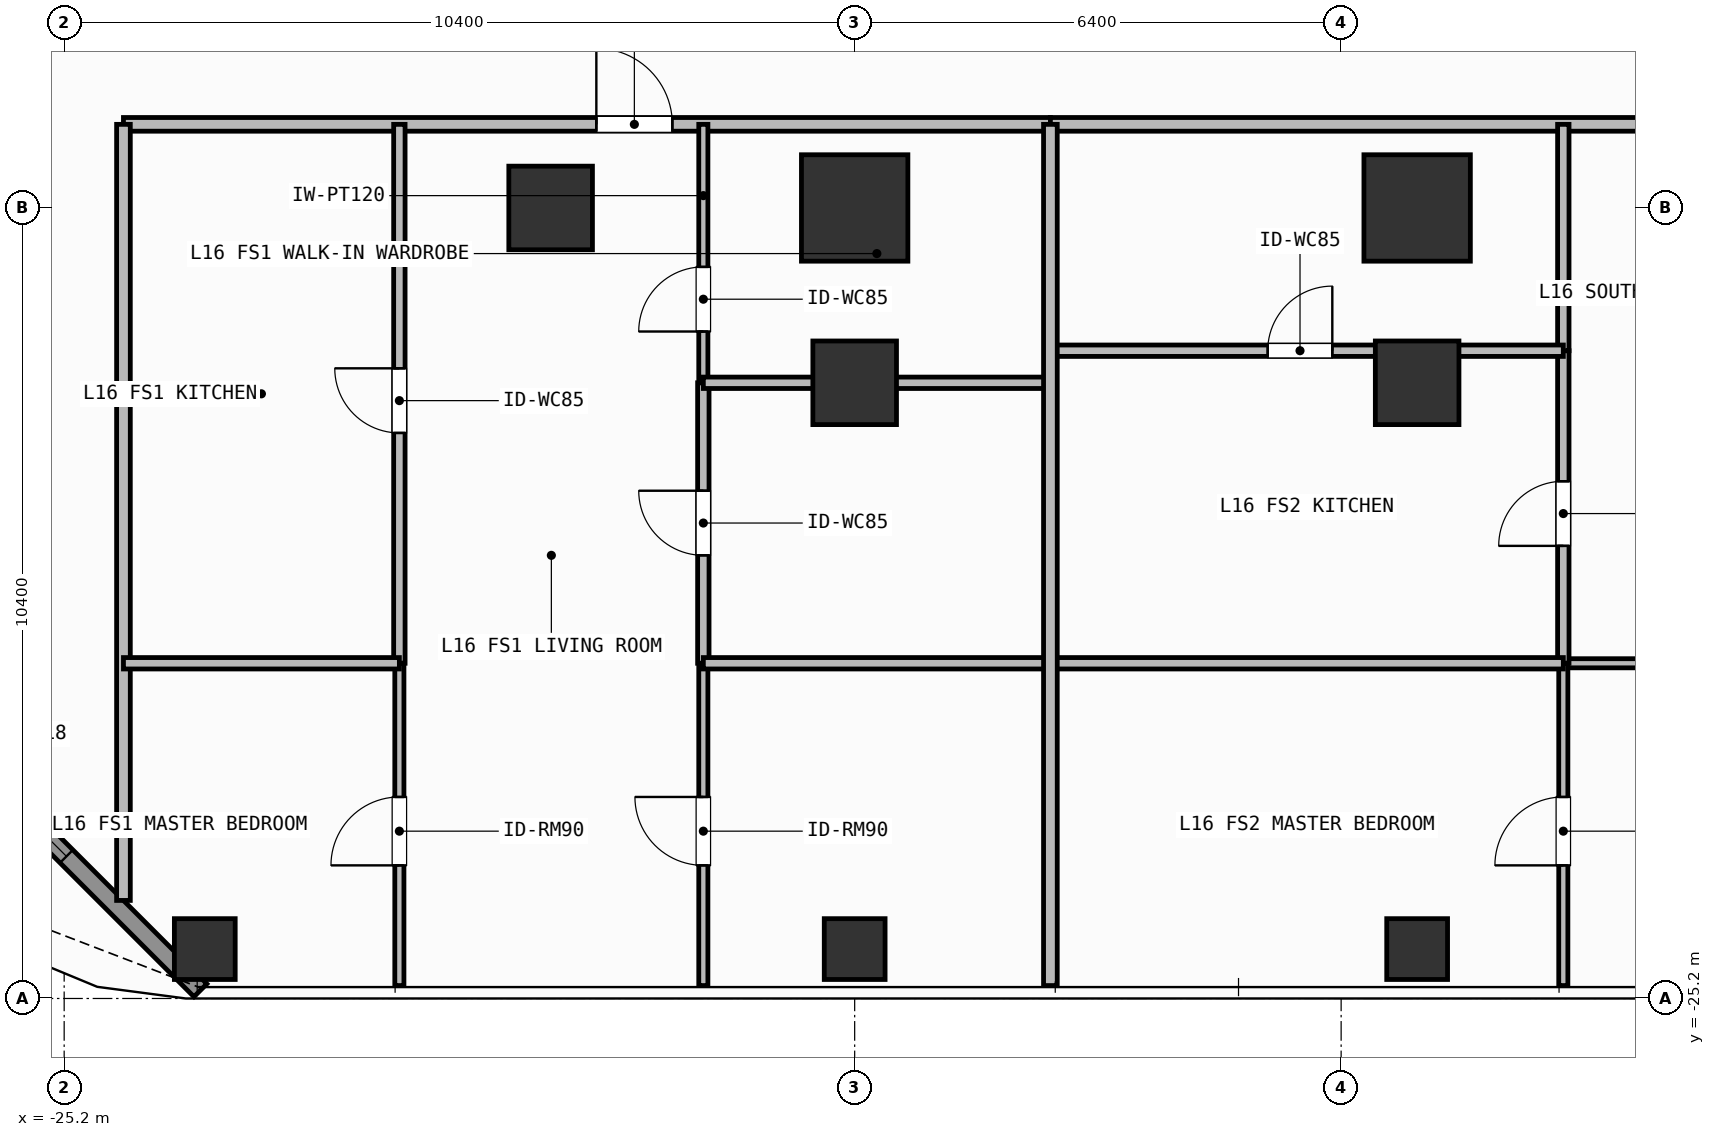
"""IFC4 building model, lengths in metres.
Left out: names, types, materials, properties, quantities, classifications, styles, units other than length and angle.
Written with IfcOpenShell. Run it as: python <this file> out.ifc"""

import sys

from ifc_helpers import new_model, si_unit, direction, frame, frame_2d, origin, origin_2d, place, context, subcontext, project, spatial, rectangle, hollow_rectangle, extrude, element, fill, save


model = new_model("IFC4")
c1 = context("Model", 3, precision=1e-05, world=origin(), true_north=direction((0.0, 1.0)))
c2 = subcontext(c1, "Body", "Model", "MODEL_VIEW")
j1 = project(units=[si_unit("LENGTHUNIT", "METRE"), si_unit("PLANEANGLEUNIT", "RADIAN")], contexts=[c1])
p1 = place(None, origin())
s1 = spatial("IfcSite", under=j1, at=p1, CompositionType="ELEMENT")
p2 = place(p1, origin())
s2 = spatial("IfcBuilding", under=s1, at=p2, CompositionType="ELEMENT")
p3 = place(p2, frame((0.0, 0.0, 61.8)))
s3 = spatial("IfcBuildingStorey", under=s2, at=p3, CompositionType="ELEMENT", Elevation=61.8)
for number, where, z_axis, x_axis in (
    (1, (-14.8, -14.8, 0.0), (0.0, 0.0, 1.0), (1.0, 0.0, 0.0)),
    (2, (-7.4, -14.8, 0.0), (0.0, 0.0, 1.0), (1.0, 0.0, 0.0)),
):
    element("IfcColumn", number, at=place(p3, frame(where, z_axis=z_axis, x_axis=x_axis)), inside=s3, PredefinedType="COLUMN", context=c2, shape_type="SweptSolid", body=[
        extrude(rectangle(XDim=1.4, YDim=1.4, at=origin_2d()), origin(), (0.0, 0.0, 1.0), 3.9),
    ])
for number, where, z_axis, x_axis in (
    (3, (-18.8, -14.8, 0.0), (0.0, 0.0, 1.0), (1.0, 0.0, 0.0)),
    (4, (-14.8, -17.1, 0.0), (0.0, 0.0, 1.0), (1.0, 0.0, 0.0)),
    (5, (-7.4, -17.1, 0.0), (0.0, 0.0, 1.0), (1.0, 0.0, 0.0)),
):
    element("IfcColumn", number, at=place(p3, frame(where, z_axis=z_axis, x_axis=x_axis)), inside=s3, PredefinedType="COLUMN", context=c2, shape_type="SweptSolid", body=[
        extrude(rectangle(XDim=1.1, YDim=1.1, at=origin_2d()), origin(), (0.0, 0.0, 1.0), 3.9),
    ])
for number, where, z_axis, x_axis in (
    (6, (-23.35, -24.55, 0.0), (0.0, 0.0, 1.0), (1.0, 0.0, 0.0)),
    (7, (-14.8, -24.55, 0.0), (0.0, 0.0, 1.0), (1.0, 0.0, 0.0)),
    (8, (-7.4, -24.55, 0.0), (0.0, 0.0, 1.0), (1.0, 0.0, 0.0)),
):
    element("IfcColumn", number, at=place(p3, frame(where, z_axis=z_axis, x_axis=x_axis)), inside=s3, PredefinedType="COLUMN", context=c2, shape_type="SweptSolid", body=[
        extrude(hollow_rectangle(XDim=0.8, YDim=0.8, WallThickness=0.036, at=origin_2d()), origin(), (0.0, 0.0, 1.0), 3.9),
    ])
p4 = place(p3, frame((-23.408, -25.092, 0.0), z_axis=(0.0, 0.0, 1.0), x_axis=(-0.707106781187, 0.707106781187, 0.0)))
e9 = element("IfcWall", 9, at=p4, inside=s3, PredefinedType="SOLIDWALL", context=c2, shape_type="SweptSolid", body=[
    extrude(rectangle(XDim=6.484, YDim=0.24, at=frame_2d((3.242, 0.0))), origin(), (0.0, 0.0, 1.0), 3.68),
])
p5 = place(p4, frame((2.492, 0.0, 0.8)))
e10 = element("IfcOpeningElement", 10, at=p5, cuts=e9, PredefinedType="OPENING", context=c2, shape_type="SweptSolid", body=[
    extrude(rectangle(XDim=1.5, YDim=1.85, at=frame_2d((0.75, 0.925))), frame((0.0, 0.13, 0.0), z_axis=(0.0, -1.0, 0.0), x_axis=(1.0, 0.0, 0.0)), (0.0, 0.0, 1.0), 0.26),
])
p6 = place(p3, frame((-24.42, -13.7, 0.0), z_axis=(0.0, 0.0, 1.0), x_axis=(1.0, 0.0, 0.0)))
e11 = element("IfcWall", 11, at=p6, inside=s3, PredefinedType="PARTITIONING", context=c2, shape_type="SweptSolid", body=[
    extrude(rectangle(XDim=12.195, YDim=0.18, at=frame_2d((6.097, 0.0))), origin(), (0.0, 0.0, 1.0), 3.68),
])
p7 = place(p6, frame((6.221, 0.0, 0.0)))
e12 = element("IfcOpeningElement", 12, at=p7, cuts=e11, PredefinedType="OPENING", context=c2, shape_type="SweptSolid", body=[
    extrude(rectangle(XDim=1.0, YDim=2.2, at=frame_2d((0.5, 1.1))), frame((0.0, 0.1, 0.0), z_axis=(0.0, -1.0, 0.0), x_axis=(1.0, 0.0, 0.0)), (0.0, 0.0, 1.0), 0.2),
])
p8 = place(p3, frame((-20.79, -20.79, 0.0), z_axis=(0.0, 0.0, 1.0), x_axis=(0.0, 1.0, 0.0)))
e13 = element("IfcWall", 13, at=p8, inside=s3, PredefinedType="PARTITIONING", context=c2, shape_type="SweptSolid", body=[
    extrude(rectangle(XDim=7.09, YDim=0.15, at=frame_2d((3.545, 0.0))), origin(), (0.0, 0.0, 1.0), 3.68),
])
p9 = place(p8, frame((3.03, 0.0, 0.0)))
e14 = element("IfcOpeningElement", 14, at=p9, cuts=e13, PredefinedType="OPENING", context=c2, shape_type="SweptSolid", body=[
    extrude(rectangle(XDim=0.85, YDim=2.1, at=frame_2d((0.425, 1.05))), frame((0.0, 0.085, 0.0), z_axis=(0.0, -1.0, 0.0), x_axis=(1.0, 0.0, 0.0)), (0.0, 0.0, 1.0), 0.17),
])
p10 = place(p3, frame((-20.79, -25.03, 0.0), z_axis=(0.0, 0.0, 1.0), x_axis=(0.0, 1.0, 0.0)))
e15 = element("IfcWall", 15, at=p10, inside=s3, PredefinedType="PARTITIONING", context=c2, shape_type="SweptSolid", body=[
    extrude(rectangle(XDim=4.24, YDim=0.12, at=frame_2d((2.12, 0.0))), origin(), (0.0, 0.0, 1.0), 3.68),
])
p11 = place(p10, frame((1.581, 0.0, 0.0)))
e16 = element("IfcOpeningElement", 16, at=p11, cuts=e15, PredefinedType="OPENING", context=c2, shape_type="SweptSolid", body=[
    extrude(rectangle(XDim=0.9, YDim=2.1, at=frame_2d((0.45, 1.05))), frame((0.0, 0.07, 0.0), z_axis=(0.0, -1.0, 0.0), x_axis=(1.0, 0.0, 0.0)), (0.0, 0.0, 1.0), 0.14),
])
p12 = place(p3, frame((-16.791, -20.79, 0.0), z_axis=(0.0, 0.0, 1.0), x_axis=(0.0, 1.0, 0.0)))
e17 = element("IfcWall", 17, at=p12, inside=s3, PredefinedType="PARTITIONING", context=c2, shape_type="SweptSolid", body=[
    extrude(rectangle(XDim=3.69, YDim=0.15, at=frame_2d((1.845, 0.0))), origin(), (0.0, 0.0, 1.0), 3.68),
])
p13 = place(p12, frame((1.42, 0.0, 0.0)))
e18 = element("IfcOpeningElement", 18, at=p13, cuts=e17, PredefinedType="OPENING", context=c2, shape_type="SweptSolid", body=[
    extrude(rectangle(XDim=0.85, YDim=2.1, at=frame_2d((0.425, 1.05))), frame((0.0, 0.085, 0.0), z_axis=(0.0, -1.0, 0.0), x_axis=(1.0, 0.0, 0.0)), (0.0, 0.0, 1.0), 0.17),
])
p14 = place(p3, frame((-16.791, -17.1, 0.0), z_axis=(0.0, 0.0, 1.0), x_axis=(0.0, 1.0, 0.0)))
e19 = element("IfcWall", 19, at=p14, inside=s3, PredefinedType="PARTITIONING", context=c2, shape_type="SweptSolid", body=[
    extrude(rectangle(XDim=3.4, YDim=0.12, at=frame_2d((1.7, 0.0))), origin(), (0.0, 0.0, 1.0), 3.68),
])
p15 = place(p14, frame((0.675, 0.0, 0.0)))
e20 = element("IfcOpeningElement", 20, at=p15, cuts=e19, PredefinedType="OPENING", context=c2, shape_type="SweptSolid", body=[
    extrude(rectangle(XDim=0.85, YDim=2.1, at=frame_2d((0.425, 1.05))), frame((0.0, 0.07, 0.0), z_axis=(0.0, -1.0, 0.0), x_axis=(1.0, 0.0, 0.0)), (0.0, 0.0, 1.0), 0.14),
])
p16 = place(p3, frame((-16.791, -25.03, 0.0), z_axis=(0.0, 0.0, 1.0), x_axis=(0.0, 1.0, 0.0)))
e21 = element("IfcWall", 21, at=p16, inside=s3, PredefinedType="PARTITIONING", context=c2, shape_type="SweptSolid", body=[
    extrude(rectangle(XDim=4.24, YDim=0.12, at=frame_2d((2.12, 0.0))), origin(), (0.0, 0.0, 1.0), 3.68),
])
p17 = place(p16, frame((1.581, 0.0, 0.0)))
e22 = element("IfcOpeningElement", 22, at=p17, cuts=e21, PredefinedType="OPENING", context=c2, shape_type="SweptSolid", body=[
    extrude(rectangle(XDim=0.9, YDim=2.1, at=frame_2d((0.45, 1.05))), frame((0.0, 0.07, 0.0), z_axis=(0.0, -1.0, 0.0), x_axis=(1.0, 0.0, 0.0)), (0.0, 0.0, 1.0), 0.14),
])
p18 = place(p3, frame((-12.225, -13.7, 0.0), z_axis=(0.0, 0.0, 1.0), x_axis=(1.0, 0.0, 0.0)))
e23 = element("IfcWall", 23, at=p18, inside=s3, PredefinedType="PARTITIONING", context=c2, shape_type="SweptSolid", body=[
    extrude(rectangle(XDim=17.467, YDim=0.18, at=frame_2d((8.733, 0.0))), origin(), (0.0, 0.0, 1.0), 3.68),
])
p19 = place(p18, frame((9.848, 0.0, 0.0)))
e24 = element("IfcOpeningElement", 24, at=p19, cuts=e23, PredefinedType="OPENING", context=c2, shape_type="SweptSolid", body=[
    extrude(rectangle(XDim=1.0, YDim=2.2, at=frame_2d((0.5, 1.1))), frame((0.0, 0.1, 0.0), z_axis=(0.0, -1.0, 0.0), x_axis=(1.0, 0.0, 0.0)), (0.0, 0.0, 1.0), 0.2),
])
p20 = place(p3, frame((-5.477, -20.79, 0.0), z_axis=(0.0, 0.0, 1.0), x_axis=(1.0, 0.0, 0.0)))
e25 = element("IfcWall", 25, at=p20, inside=s3, PredefinedType="PARTITIONING", context=c2, shape_type="SweptSolid", body=[
    extrude(rectangle(XDim=7.471, YDim=0.12, at=frame_2d((3.735, 0.0))), origin(), (0.0, 0.0, 1.0), 3.68),
])
p21 = place(p20, frame((3.375, 0.0, 0.0)))
e26 = element("IfcOpeningElement", 26, at=p21, cuts=e25, PredefinedType="OPENING", context=c2, shape_type="SweptSolid", body=[
    extrude(rectangle(XDim=0.9, YDim=2.1, at=frame_2d((0.45, 1.05))), frame((0.0, 0.07, 0.0), z_axis=(0.0, -1.0, 0.0), x_axis=(1.0, 0.0, 0.0)), (0.0, 0.0, 1.0), 0.14),
])
p22 = place(p3, frame((-5.477, -20.79, 0.0), z_axis=(0.0, 0.0, 1.0), x_axis=(0.0, 1.0, 0.0)))
e27 = element("IfcWall", 27, at=p22, inside=s3, PredefinedType="PARTITIONING", context=c2, shape_type="SweptSolid", body=[
    extrude(rectangle(XDim=4.112, YDim=0.15, at=frame_2d((2.056, 0.0))), origin(), (0.0, 0.0, 1.0), 3.68),
])
p23 = place(p22, frame((1.544, 0.0, 0.0)))
e28 = element("IfcOpeningElement", 28, at=p23, cuts=e27, PredefinedType="OPENING", context=c2, shape_type="SweptSolid", body=[
    extrude(rectangle(XDim=0.85, YDim=2.1, at=frame_2d((0.425, 1.05))), frame((0.0, 0.085, 0.0), z_axis=(0.0, -1.0, 0.0), x_axis=(1.0, 0.0, 0.0)), (0.0, 0.0, 1.0), 0.17),
])
p24 = place(p3, frame((-5.477, -16.678, 0.0), z_axis=(0.0, 0.0, 1.0), x_axis=(0.0, 1.0, 0.0)))
e29 = element("IfcWall", 29, at=p24, inside=s3, PredefinedType="PARTITIONING", context=c2, shape_type="SweptSolid", body=[
    extrude(rectangle(XDim=2.978, YDim=0.15, at=frame_2d((1.489, 0.0))), origin(), (0.0, 0.0, 1.0), 3.68),
])
p25 = place(p3, frame((-5.477, -25.03, 0.0), z_axis=(0.0, 0.0, 1.0), x_axis=(0.0, 1.0, 0.0)))
e30 = element("IfcWall", 30, at=p25, inside=s3, PredefinedType="PARTITIONING", context=c2, shape_type="SweptSolid", body=[
    extrude(rectangle(XDim=4.24, YDim=0.12, at=frame_2d((2.12, 0.0))), origin(), (0.0, 0.0, 1.0), 3.68),
])
p26 = place(p25, frame((1.581, 0.0, 0.0)))
e31 = element("IfcOpeningElement", 31, at=p26, cuts=e30, PredefinedType="OPENING", context=c2, shape_type="SweptSolid", body=[
    extrude(rectangle(XDim=0.9, YDim=2.1, at=frame_2d((0.45, 1.05))), frame((0.0, 0.07, 0.0), z_axis=(0.0, -1.0, 0.0), x_axis=(1.0, 0.0, 0.0)), (0.0, 0.0, 1.0), 0.14),
])
p27 = place(p3, frame((-24.42, -23.91, 0.0), z_axis=(0.0, 0.0, 1.0), x_axis=(0.0, 1.0, 0.0)))
e32 = element("IfcWall", 32, at=p27, inside=s3, PredefinedType="PARTITIONING", context=c2, shape_type="SweptSolid", body=[
    extrude(rectangle(XDim=10.21, YDim=0.18, at=frame_2d((5.105, 0.0))), origin(), (0.0, 0.0, 1.0), 3.68),
])
p28 = place(p3, frame((-24.42, -20.79, 0.0), z_axis=(0.0, 0.0, 1.0), x_axis=(1.0, 0.0, 0.0)))
e33 = element("IfcWall", 33, at=p28, inside=s3, PredefinedType="PARTITIONING", context=c2, shape_type="SweptSolid", body=[
    extrude(rectangle(XDim=3.63, YDim=0.15, at=frame_2d((1.815, 0.0))), origin(), (0.0, 0.0, 1.0), 3.68),
])
p29 = place(p3, frame((-16.791, -17.1, 0.0), z_axis=(0.0, 0.0, 1.0), x_axis=(1.0, 0.0, 0.0)))
e34 = element("IfcWall", 34, at=p29, inside=s3, PredefinedType="PARTITIONING", context=c2, shape_type="SweptSolid", body=[
    extrude(rectangle(XDim=4.566, YDim=0.15, at=frame_2d((2.283, 0.0))), origin(), (0.0, 0.0, 1.0), 3.082),
])
p30 = place(p3, frame((-16.791, -20.79, 0.0), z_axis=(0.0, 0.0, 1.0), x_axis=(1.0, 0.0, 0.0)))
e35 = element("IfcWall", 35, at=p30, inside=s3, PredefinedType="PARTITIONING", context=c2, shape_type="SweptSolid", body=[
    extrude(rectangle(XDim=4.566, YDim=0.15, at=frame_2d((2.283, 0.0))), origin(), (0.0, 0.0, 1.0), 3.68),
])
p31 = place(p3, frame((-12.225, -16.678, 0.0), z_axis=(0.0, 0.0, 1.0), x_axis=(1.0, 0.0, 0.0)))
e36 = element("IfcWall", 36, at=p31, inside=s3, PredefinedType="PARTITIONING", context=c2, shape_type="SweptSolid", body=[
    extrude(rectangle(XDim=6.748, YDim=0.15, at=frame_2d((3.374, 0.0))), origin(), (0.0, 0.0, 1.0), 3.68),
])
p32 = place(p31, frame((2.859, 0.0, 0.0)))
e37 = element("IfcOpeningElement", 37, at=p32, cuts=e36, PredefinedType="OPENING", context=c2, shape_type="SweptSolid", body=[
    extrude(rectangle(XDim=0.85, YDim=2.1, at=frame_2d((0.425, 1.05))), frame((0.0, 0.085, 0.0), z_axis=(0.0, -1.0, 0.0), x_axis=(1.0, 0.0, 0.0)), (0.0, 0.0, 1.0), 0.17),
])
p33 = place(p3, frame((-12.225, -20.79, 0.0), z_axis=(0.0, 0.0, 1.0), x_axis=(1.0, 0.0, 0.0)))
e38 = element("IfcWall", 38, at=p33, inside=s3, PredefinedType="PARTITIONING", context=c2, shape_type="SweptSolid", body=[
    extrude(rectangle(XDim=6.748, YDim=0.15, at=frame_2d((3.374, 0.0))), origin(), (0.0, 0.0, 1.0), 3.68),
])
p34 = place(p3, frame((-12.225, -25.03, 0.0), z_axis=(0.0, 0.0, 1.0), x_axis=(0.0, 1.0, 0.0)))
e39 = element("IfcWall", 39, at=p34, inside=s3, PredefinedType="PARTITIONING", context=c2, shape_type="SweptSolid", body=[
    extrude(rectangle(XDim=11.33, YDim=0.18, at=frame_2d((5.665, 0.0))), origin(), (0.0, 0.0, 1.0), 3.68),
])
p35 = place(p5, origin())
e40 = element("IfcWindow", 40, at=p35, inside=s3, PartitioningType="SINGLE_PANEL", PredefinedType="WINDOW", context=c2, shape_type="SweptSolid", body=[
    extrude(rectangle(XDim=1.5, YDim=1.85, at=frame_2d((0.75, 0.925))), frame((0.0, 0.03, 0.0), z_axis=(0.0, -1.0, 0.0), x_axis=(1.0, 0.0, 0.0)), (0.0, 0.0, 1.0), 0.06),
])
fill(e10, e40)
p36 = place(p7, origin())
e41 = element("IfcDoor", 41, at=p36, inside=s3, OperationType="SINGLE_SWING_LEFT", PredefinedType="DOOR", context=c2, shape_type="SweptSolid", body=[
    extrude(rectangle(XDim=1.0, YDim=2.2, at=frame_2d((0.5, 1.1))), frame((0.0, 0.025, 0.0), z_axis=(0.0, -1.0, 0.0), x_axis=(1.0, 0.0, 0.0)), (0.0, 0.0, 1.0), 0.05),
])
fill(e12, e41)
p37 = place(p9, origin())
e42 = element("IfcDoor", 42, at=p37, inside=s3, OperationType="SINGLE_SWING_RIGHT", PredefinedType="DOOR", context=c2, shape_type="SweptSolid", body=[
    extrude(rectangle(XDim=0.85, YDim=2.1, at=frame_2d((0.425, 1.05))), frame((0.0, 0.025, 0.0), z_axis=(0.0, -1.0, 0.0), x_axis=(1.0, 0.0, 0.0)), (0.0, 0.0, 1.0), 0.05),
])
fill(e14, e42)
p38 = place(p11, origin())
e43 = element("IfcDoor", 43, at=p38, inside=s3, OperationType="SINGLE_SWING_LEFT", PredefinedType="DOOR", context=c2, shape_type="SweptSolid", body=[
    extrude(rectangle(XDim=0.9, YDim=2.1, at=frame_2d((0.45, 1.05))), frame((0.0, 0.025, 0.0), z_axis=(0.0, -1.0, 0.0), x_axis=(1.0, 0.0, 0.0)), (0.0, 0.0, 1.0), 0.05),
])
fill(e16, e43)
p39 = place(p13, origin())
e44 = element("IfcDoor", 44, at=p39, inside=s3, OperationType="SINGLE_SWING_RIGHT", PredefinedType="DOOR", context=c2, shape_type="SweptSolid", body=[
    extrude(rectangle(XDim=0.85, YDim=2.1, at=frame_2d((0.425, 1.05))), frame((0.0, 0.025, 0.0), z_axis=(0.0, -1.0, 0.0), x_axis=(1.0, 0.0, 0.0)), (0.0, 0.0, 1.0), 0.05),
])
fill(e18, e44)
p40 = place(p15, origin())
e45 = element("IfcDoor", 45, at=p40, inside=s3, OperationType="SINGLE_SWING_LEFT", PredefinedType="DOOR", context=c2, shape_type="SweptSolid", body=[
    extrude(rectangle(XDim=0.85, YDim=2.1, at=frame_2d((0.425, 1.05))), frame((0.0, 0.025, 0.0), z_axis=(0.0, -1.0, 0.0), x_axis=(1.0, 0.0, 0.0)), (0.0, 0.0, 1.0), 0.05),
])
fill(e20, e45)
p41 = place(p17, origin())
e46 = element("IfcDoor", 46, at=p41, inside=s3, OperationType="SINGLE_SWING_RIGHT", PredefinedType="DOOR", context=c2, shape_type="SweptSolid", body=[
    extrude(rectangle(XDim=0.9, YDim=2.1, at=frame_2d((0.45, 1.05))), frame((0.0, 0.025, 0.0), z_axis=(0.0, -1.0, 0.0), x_axis=(1.0, 0.0, 0.0)), (0.0, 0.0, 1.0), 0.05),
])
fill(e22, e46)
p42 = place(p23, origin())
e47 = element("IfcDoor", 47, at=p42, inside=s3, OperationType="SINGLE_SWING_LEFT", PredefinedType="DOOR", context=c2, shape_type="SweptSolid", body=[
    extrude(rectangle(XDim=0.85, YDim=2.1, at=frame_2d((0.425, 1.05))), frame((0.0, 0.025, 0.0), z_axis=(0.0, -1.0, 0.0), x_axis=(1.0, 0.0, 0.0)), (0.0, 0.0, 1.0), 0.05),
])
fill(e28, e47)
p43 = place(p32, origin())
e48 = element("IfcDoor", 48, at=p43, inside=s3, OperationType="SINGLE_SWING_RIGHT", PredefinedType="DOOR", context=c2, shape_type="SweptSolid", body=[
    extrude(rectangle(XDim=0.85, YDim=2.1, at=frame_2d((0.425, 1.05))), frame((0.0, 0.025, 0.0), z_axis=(0.0, -1.0, 0.0), x_axis=(1.0, 0.0, 0.0)), (0.0, 0.0, 1.0), 0.05),
])
fill(e37, e48)
p44 = place(p26, origin())
e49 = element("IfcDoor", 49, at=p44, inside=s3, OperationType="SINGLE_SWING_LEFT", PredefinedType="DOOR", context=c2, shape_type="SweptSolid", body=[
    extrude(rectangle(XDim=0.9, YDim=2.1, at=frame_2d((0.45, 1.05))), frame((0.0, 0.025, 0.0), z_axis=(0.0, -1.0, 0.0), x_axis=(1.0, 0.0, 0.0)), (0.0, 0.0, 1.0), 0.05),
])
fill(e31, e49)
save(model, sys.argv[1])
